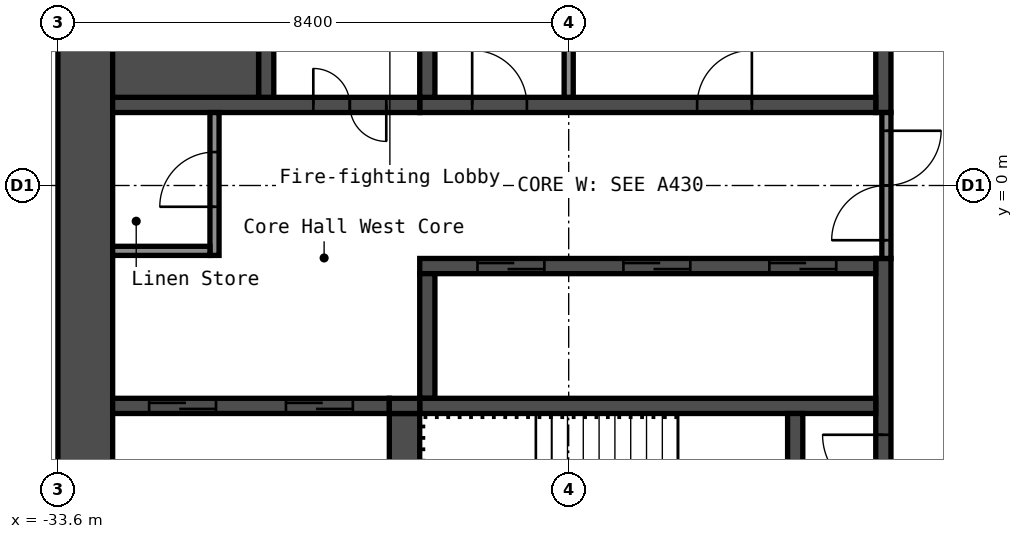
"""IFC4 building model, lengths in metres.
Left out: names, types, materials, properties, quantities, classifications, styles, units other than length and angle.
Written with IfcOpenShell. Run it as: python <this file> out.ifc"""

import sys

from ifc_helpers import new_model, si_unit, direction, frame, frame_2d, origin, place, context, subcontext, project, spatial, rectangle, extrude, element, fill, save


model = new_model("IFC4")
c1 = context("Model", 3, precision=1e-05, world=origin(), true_north=direction((0.0, 1.0)))
c2 = subcontext(c1, "Body", "Model", "MODEL_VIEW")
j1 = project(units=[si_unit("LENGTHUNIT", "METRE"), si_unit("PLANEANGLEUNIT", "RADIAN")], contexts=[c1])
p1 = place(None, origin())
s1 = spatial("IfcSite", under=j1, at=p1, CompositionType="ELEMENT")
p2 = place(p1, origin())
s2 = spatial("IfcBuilding", under=s1, at=p2, CompositionType="ELEMENT")
p3 = place(p2, frame((0.0, 0.0, 212.2)))
s3 = spatial("IfcBuildingStorey", under=s2, at=p3, CompositionType="ELEMENT", Elevation=212.2)
p4 = place(p3, frame((-33.15, -8.4, 0.0), z_axis=(0.0, 0.0, 1.0), x_axis=(0.0, 1.0, 0.0)))
e1 = element("IfcWall", 1, at=p4, inside=s3, PredefinedType="SHEAR", context=c2, shape_type="SweptSolid", body=[
    extrude(rectangle(XDim=16.8, YDim=0.9, at=frame_2d((8.4, 0.0))), origin(), (0.0, 0.0, 1.0), 2.75),
])
p5 = place(p3, frame((-20.025, 1.2, 0.0), z_axis=(0.0, 0.0, 1.0), x_axis=(0.0, 1.0, 0.0)))
e2 = element("IfcWall", 2, at=p5, inside=s3, PredefinedType="SHEAR", context=c2, shape_type="SweptSolid", body=[
    extrude(rectangle(XDim=6.3, YDim=0.25, at=frame_2d((3.15, 0.0))), origin(), (0.0, 0.0, 1.0), 2.75),
])
p6 = place(p3, frame((-20.025, -7.5, 0.0), z_axis=(0.0, 0.0, 1.0), x_axis=(0.0, 1.0, 0.0)))
e3 = element("IfcWall", 3, at=p6, inside=s3, PredefinedType="SHEAR", context=c2, shape_type="SweptSolid", body=[
    extrude(rectangle(XDim=6.3, YDim=0.25, at=frame_2d((3.15, 0.0))), origin(), (0.0, 0.0, 1.0), 2.75),
])
p7 = place(p6, frame((2.4, 0.0, 0.0)))
e4 = element("IfcOpeningElement", 4, at=p7, cuts=e3, PredefinedType="OPENING", context=c2, shape_type="SweptSolid", body=[
    extrude(rectangle(XDim=1.0, YDim=2.1, at=frame_2d((0.5, 1.05))), frame((0.0, 0.135, 0.0), z_axis=(0.0, -1.0, 0.0), x_axis=(1.0, 0.0, 0.0)), (0.0, 0.0, 1.0), 0.27),
])
p8 = place(p3, frame((-27.65, 1.325, 0.0), z_axis=(0.0, 0.0, 1.0), x_axis=(1.0, 0.0, 0.0)))
e5 = element("IfcWall", 5, at=p8, inside=s3, PredefinedType="SHEAR", context=c2, shape_type="SweptSolid", body=[
    extrude(rectangle(XDim=7.5, YDim=0.25, at=frame_2d((3.75, 0.0))), origin(), (0.0, 0.0, 1.0), 2.75),
])
p9 = place(p8, frame((4.562, 0.0, 0.0)))
e6 = element("IfcOpeningElement", 6, at=p9, cuts=e5, PredefinedType="OPENING", context=c2, shape_type="SweptSolid", body=[
    extrude(rectangle(XDim=0.9, YDim=2.1, at=frame_2d((0.45, 1.05))), frame((0.0, 0.135, 0.0), z_axis=(0.0, -1.0, 0.0), x_axis=(1.0, 0.0, 0.0)), (0.0, 0.0, 1.0), 0.27),
])
p10 = place(p8, frame((0.863, 0.0, 0.0)))
e7 = element("IfcOpeningElement", 7, at=p10, cuts=e5, PredefinedType="OPENING", context=c2, shape_type="SweptSolid", body=[
    extrude(rectangle(XDim=0.9, YDim=2.1, at=frame_2d((0.45, 1.05))), frame((0.0, 0.135, 0.0), z_axis=(0.0, -1.0, 0.0), x_axis=(1.0, 0.0, 0.0)), (0.0, 0.0, 1.0), 0.27),
])
p11 = place(p3, frame((-27.525, 1.45, 0.0), z_axis=(0.0, 0.0, 1.0), x_axis=(0.0, 1.0, 0.0)))
e8 = element("IfcWall", 8, at=p11, inside=s3, PredefinedType="SHEAR", context=c2, shape_type="SweptSolid", body=[
    extrude(rectangle(XDim=2.05, YDim=0.25, at=frame_2d((1.025, 0.0))), origin(), (0.0, 0.0, 1.0), 2.75),
])
p12 = place(p3, frame((-32.7, 1.325, 0.0), z_axis=(0.0, 0.0, 1.0), x_axis=(1.0, 0.0, 0.0)))
e9 = element("IfcWall", 9, at=p12, inside=s3, PredefinedType="SHEAR", context=c2, shape_type="SweptSolid", body=[
    extrude(rectangle(XDim=5.05, YDim=0.25, at=frame_2d((2.525, 0.0))), origin(), (0.0, 0.0, 1.0), 2.75),
])
p13 = place(p12, frame((3.3, 0.0, 0.0)))
e10 = element("IfcOpeningElement", 10, at=p13, cuts=e9, PredefinedType="OPENING", context=c2, shape_type="SweptSolid", body=[
    extrude(rectangle(XDim=1.2, YDim=2.1, at=frame_2d((0.6, 1.05))), frame((0.0, 0.135, 0.0), z_axis=(0.0, -1.0, 0.0), x_axis=(1.0, 0.0, 0.0)), (0.0, 0.0, 1.0), 0.27),
])
p14 = place(p3, frame((-30.175, 1.45, 0.0), z_axis=(0.0, 0.0, 1.0), x_axis=(0.0, 1.0, 0.0)))
e11 = element("IfcWall", 11, at=p14, inside=s3, PredefinedType="SHEAR", context=c2, shape_type="SweptSolid", body=[
    extrude(rectangle(XDim=6.05, YDim=0.25, at=frame_2d((3.025, 0.0))), origin(), (0.0, 0.0, 1.0), 2.75),
])
p15 = place(p14, frame((2.625, 0.0, 0.0)))
e12 = element("IfcOpeningElement", 12, at=p15, cuts=e11, PredefinedType="OPENING", context=c2, shape_type="SweptSolid", body=[
    extrude(rectangle(XDim=1.1, YDim=2.1, at=frame_2d((0.55, 1.05))), frame((0.0, 0.135, 0.0), z_axis=(0.0, -1.0, 0.0), x_axis=(1.0, 0.0, 0.0)), (0.0, 0.0, 1.0), 0.27),
])
p16 = place(p3, frame((-32.7, 2.375, 0.0), z_axis=(0.0, 0.0, 1.0), x_axis=(1.0, 0.0, 0.0)))
e13 = element("IfcWall", 13, at=p16, inside=s3, PredefinedType="SHEAR", context=c2, shape_type="SweptSolid", body=[
    extrude(rectangle(XDim=2.4, YDim=1.85, at=frame_2d((1.2, 0.0))), origin(), (0.0, 0.0, 1.0), 2.75),
])
p17 = place(p3, frame((-27.65, -1.325, 0.0), z_axis=(0.0, 0.0, 1.0), x_axis=(1.0, 0.0, 0.0)))
e14 = element("IfcWall", 14, at=p17, inside=s3, PredefinedType="SHEAR", context=c2, shape_type="SweptSolid", body=[
    extrude(rectangle(XDim=7.5, YDim=0.25, at=frame_2d((3.75, 0.0))), origin(), (0.0, 0.0, 1.0), 2.75),
])
p18 = place(p17, frame((5.75, 0.0, 0.0)))
e15 = element("IfcOpeningElement", 15, at=p18, cuts=e14, PredefinedType="OPENING", context=c2, shape_type="SweptSolid", body=[
    extrude(rectangle(XDim=1.1, YDim=2.1, at=frame_2d((0.55, 1.05))), frame((0.0, 0.135, 0.0), z_axis=(0.0, -1.0, 0.0), x_axis=(1.0, 0.0, 0.0)), (0.0, 0.0, 1.0), 0.27),
])
p19 = place(p17, frame((3.35, 0.0, 0.0)))
e16 = element("IfcOpeningElement", 16, at=p19, cuts=e14, PredefinedType="OPENING", context=c2, shape_type="SweptSolid", body=[
    extrude(rectangle(XDim=1.1, YDim=2.1, at=frame_2d((0.55, 1.05))), frame((0.0, 0.135, 0.0), z_axis=(0.0, -1.0, 0.0), x_axis=(1.0, 0.0, 0.0)), (0.0, 0.0, 1.0), 0.27),
])
p20 = place(p17, frame((0.95, 0.0, 0.0)))
e17 = element("IfcOpeningElement", 17, at=p20, cuts=e14, PredefinedType="OPENING", context=c2, shape_type="SweptSolid", body=[
    extrude(rectangle(XDim=1.1, YDim=2.1, at=frame_2d((0.55, 1.05))), frame((0.0, 0.135, 0.0), z_axis=(0.0, -1.0, 0.0), x_axis=(1.0, 0.0, 0.0)), (0.0, 0.0, 1.0), 0.27),
])
p21 = place(p3, frame((-27.525, -3.5, 0.0), z_axis=(0.0, 0.0, 1.0), x_axis=(0.0, 1.0, 0.0)))
e18 = element("IfcWall", 18, at=p21, inside=s3, PredefinedType="SHEAR", context=c2, shape_type="SweptSolid", body=[
    extrude(rectangle(XDim=2.05, YDim=0.25, at=frame_2d((1.025, 0.0))), origin(), (0.0, 0.0, 1.0), 2.75),
])
p22 = place(p3, frame((-27.65, -3.625, 0.0), z_axis=(0.0, 0.0, 1.0), x_axis=(1.0, 0.0, 0.0)))
e19 = element("IfcWall", 19, at=p22, inside=s3, PredefinedType="SHEAR", context=c2, shape_type="SweptSolid", body=[
    extrude(rectangle(XDim=7.5, YDim=0.25, at=frame_2d((3.75, 0.0))), origin(), (0.0, 0.0, 1.0), 2.75),
])
p23 = place(p3, frame((-21.475, -7.5, 0.0), z_axis=(0.0, 0.0, 1.0), x_axis=(0.0, 1.0, 0.0)))
e20 = element("IfcWall", 20, at=p23, inside=s3, PredefinedType="SHEAR", context=c2, shape_type="SweptSolid", body=[
    extrude(rectangle(XDim=3.75, YDim=0.25, at=frame_2d((1.875, 0.0))), origin(), (0.0, 0.0, 1.0), 2.75),
])
p24 = place(p23, frame((1.3, 0.0, 0.0)))
e21 = element("IfcOpeningElement", 21, at=p24, cuts=e20, PredefinedType="OPENING", context=c2, shape_type="SweptSolid", body=[
    extrude(rectangle(XDim=1.2, YDim=2.1, at=frame_2d((0.6, 1.05))), frame((0.0, 0.135, 0.0), z_axis=(0.0, -1.0, 0.0), x_axis=(1.0, 0.0, 0.0)), (0.0, 0.0, 1.0), 0.27),
])
p25 = place(p3, frame((-27.9, -7.5, 0.0), z_axis=(0.0, 0.0, 1.0), x_axis=(0.0, 1.0, 0.0)))
e22 = element("IfcWall", 22, at=p25, inside=s3, PredefinedType="SHEAR", context=c2, shape_type="SweptSolid", body=[
    extrude(rectangle(XDim=3.75, YDim=0.5, at=frame_2d((1.875, 0.0))), origin(), (0.0, 0.0, 1.0), 2.75),
])
p26 = place(p3, frame((-32.7, -3.625, 0.0), z_axis=(0.0, 0.0, 1.0), x_axis=(1.0, 0.0, 0.0)))
e23 = element("IfcWall", 23, at=p26, inside=s3, PredefinedType="SHEAR", context=c2, shape_type="SweptSolid", body=[
    extrude(rectangle(XDim=4.55, YDim=0.25, at=frame_2d((2.275, 0.0))), origin(), (0.0, 0.0, 1.0), 2.75),
])
p27 = place(p26, frame((2.85, 0.0, 0.0)))
e24 = element("IfcOpeningElement", 24, at=p27, cuts=e23, PredefinedType="OPENING", context=c2, shape_type="SweptSolid", body=[
    extrude(rectangle(XDim=1.1, YDim=2.1, at=frame_2d((0.55, 1.05))), frame((0.0, 0.135, 0.0), z_axis=(0.0, -1.0, 0.0), x_axis=(1.0, 0.0, 0.0)), (0.0, 0.0, 1.0), 0.27),
])
p28 = place(p26, frame((0.6, 0.0, 0.0)))
e25 = element("IfcOpeningElement", 25, at=p28, cuts=e23, PredefinedType="OPENING", context=c2, shape_type="SweptSolid", body=[
    extrude(rectangle(XDim=1.1, YDim=2.1, at=frame_2d((0.55, 1.05))), frame((0.0, 0.135, 0.0), z_axis=(0.0, -1.0, 0.0), x_axis=(1.0, 0.0, 0.0)), (0.0, 0.0, 1.0), 0.27),
])
p29 = place(p3, frame((-28.15, -3.625, 0.0), z_axis=(0.0, 0.0, 1.0), x_axis=(1.0, 0.0, 0.0)))
e26 = element("IfcWall", 26, at=p29, inside=s3, PredefinedType="SHEAR", context=c2, shape_type="SweptSolid", body=[
    extrude(rectangle(XDim=0.5, YDim=0.25, at=frame_2d((0.25, 0.0))), origin(), (0.0, 0.0, 1.0), 2.75),
])
p30 = place(p3, frame((-19.975, -1.2, 0.0), z_axis=(0.0, 0.0, 1.0), x_axis=(0.0, 1.0, 0.0)))
e27 = element("IfcWall", 27, at=p30, inside=s3, PredefinedType="PARTITIONING", context=c2, shape_type="SweptSolid", body=[
    extrude(rectangle(XDim=2.4, YDim=0.15, at=frame_2d((1.2, 0.0))), origin(), (0.0, 0.0, 1.0), 2.75),
])
p31 = place(p30, frame((0.3, 0.0, 0.0)))
e28 = element("IfcOpeningElement", 28, at=p31, cuts=e27, PredefinedType="OPENING", context=c2, shape_type="SweptSolid", body=[
    extrude(rectangle(XDim=1.8, YDim=2.1, at=frame_2d((0.9, 1.05))), frame((0.0, 0.085, 0.0), z_axis=(0.0, -1.0, 0.0), x_axis=(1.0, 0.0, 0.0)), (0.0, 0.0, 1.0), 0.17),
])
p32 = place(p3, frame((-31.025, -1.15, 0.0), z_axis=(0.0, 0.0, 1.0), x_axis=(0.0, 1.0, 0.0)))
e29 = element("IfcWall", 29, at=p32, inside=s3, PredefinedType="PARTITIONING", context=c2, shape_type="SweptSolid", body=[
    extrude(rectangle(XDim=2.35, YDim=0.15, at=frame_2d((1.175, 0.0))), origin(), (0.0, 0.0, 1.0), 2.75),
])
p33 = place(p32, frame((0.8, 0.0, 0.0)))
e30 = element("IfcOpeningElement", 30, at=p33, cuts=e29, PredefinedType="OPENING", context=c2, shape_type="SweptSolid", body=[
    extrude(rectangle(XDim=0.9, YDim=2.1, at=frame_2d((0.45, 1.05))), frame((0.0, 0.085, 0.0), z_axis=(0.0, -1.0, 0.0), x_axis=(1.0, 0.0, 0.0)), (0.0, 0.0, 1.0), 0.17),
])
p34 = place(p3, frame((-32.7, -1.075, 0.0), z_axis=(0.0, 0.0, 1.0), x_axis=(1.0, 0.0, 0.0)))
e31 = element("IfcWall", 31, at=p34, inside=s3, PredefinedType="PARTITIONING", context=c2, shape_type="SweptSolid", body=[
    extrude(rectangle(XDim=1.6, YDim=0.15, at=frame_2d((0.8, 0.0))), origin(), (0.0, 0.0, 1.0), 2.75),
])
p35 = place(p3, frame((-25.2, 1.45, 0.0), z_axis=(0.0, 0.0, 1.0), x_axis=(0.0, 1.0, 0.0)))
e32 = element("IfcWall", 32, at=p35, inside=s3, PredefinedType="PARTITIONING", context=c2, shape_type="SweptSolid", body=[
    extrude(rectangle(XDim=2.05, YDim=0.15, at=frame_2d((1.025, 0.0))), origin(), (0.0, 0.0, 1.0), 2.75),
])
p36 = place(p7, origin())
e33 = element("IfcDoor", 33, at=p36, inside=s3, OperationType="SINGLE_SWING_LEFT", PredefinedType="DOOR", context=c2, shape_type="SweptSolid", body=[
    extrude(rectangle(XDim=1.0, YDim=2.1, at=frame_2d((0.5, 1.05))), frame((0.0, 0.025, 0.0), z_axis=(0.0, -1.0, 0.0), x_axis=(1.0, 0.0, 0.0)), (0.0, 0.0, 1.0), 0.05),
])
fill(e4, e33)
p37 = place(p13, origin())
e34 = element("IfcDoor", 34, at=p37, inside=s3, OperationType="DOUBLE_DOOR_SINGLE_SWING", PredefinedType="DOOR", context=c2, shape_type="SweptSolid", body=[
    extrude(rectangle(XDim=1.2, YDim=2.1, at=frame_2d((0.6, 1.05))), frame((0.0, 0.025, 0.0), z_axis=(0.0, -1.0, 0.0), x_axis=(1.0, 0.0, 0.0)), (0.0, 0.0, 1.0), 0.05),
])
fill(e10, e34)
p38 = place(p31, origin())
e35 = element("IfcDoor", 35, at=p38, inside=s3, OperationType="DOUBLE_DOOR_SINGLE_SWING", PredefinedType="DOOR", context=c2, shape_type="SweptSolid", body=[
    extrude(rectangle(XDim=1.8, YDim=2.1, at=frame_2d((0.9, 1.05))), frame((0.0, 0.025, 0.0), z_axis=(0.0, -1.0, 0.0), x_axis=(1.0, 0.0, 0.0)), (0.0, 0.0, 1.0), 0.05),
])
fill(e28, e35)
p39 = place(p33, origin())
e36 = element("IfcDoor", 36, at=p39, inside=s3, OperationType="SINGLE_SWING_RIGHT", PredefinedType="DOOR", context=c2, shape_type="SweptSolid", body=[
    extrude(rectangle(XDim=0.9, YDim=2.1, at=frame_2d((0.45, 1.05))), frame((0.0, 0.025, 0.0), z_axis=(0.0, -1.0, 0.0), x_axis=(1.0, 0.0, 0.0)), (0.0, 0.0, 1.0), 0.05),
])
fill(e30, e36)
p40 = place(p9, origin())
e37 = element("IfcDoor", 37, at=p40, inside=s3, OperationType="SINGLE_SWING_LEFT", PredefinedType="DOOR", context=c2, shape_type="SweptSolid", body=[
    extrude(rectangle(XDim=0.9, YDim=2.1, at=frame_2d((0.45, 1.05))), frame((0.0, 0.025, 0.0), z_axis=(0.0, -1.0, 0.0), x_axis=(1.0, 0.0, 0.0)), (0.0, 0.0, 1.0), 0.05),
])
fill(e6, e37)
p41 = place(p10, origin())
e38 = element("IfcDoor", 38, at=p41, inside=s3, OperationType="SINGLE_SWING_RIGHT", PredefinedType="DOOR", context=c2, shape_type="SweptSolid", body=[
    extrude(rectangle(XDim=0.9, YDim=2.1, at=frame_2d((0.45, 1.05))), frame((0.0, 0.025, 0.0), z_axis=(0.0, -1.0, 0.0), x_axis=(1.0, 0.0, 0.0)), (0.0, 0.0, 1.0), 0.05),
])
fill(e7, e38)
p42 = place(p18, origin())
e39 = element("IfcDoor", 39, at=p42, inside=s3, OperationType="DOUBLE_DOOR_SLIDING", PredefinedType="DOOR", context=c2, shape_type="SweptSolid", body=[
    extrude(rectangle(XDim=1.1, YDim=2.1, at=frame_2d((0.55, 1.05))), frame((0.0, 0.025, 0.0), z_axis=(0.0, -1.0, 0.0), x_axis=(1.0, 0.0, 0.0)), (0.0, 0.0, 1.0), 0.05),
])
fill(e15, e39)
p43 = place(p19, origin())
e40 = element("IfcDoor", 40, at=p43, inside=s3, OperationType="DOUBLE_DOOR_SLIDING", PredefinedType="DOOR", context=c2, shape_type="SweptSolid", body=[
    extrude(rectangle(XDim=1.1, YDim=2.1, at=frame_2d((0.55, 1.05))), frame((0.0, 0.025, 0.0), z_axis=(0.0, -1.0, 0.0), x_axis=(1.0, 0.0, 0.0)), (0.0, 0.0, 1.0), 0.05),
])
fill(e16, e40)
p44 = place(p20, origin())
e41 = element("IfcDoor", 41, at=p44, inside=s3, OperationType="DOUBLE_DOOR_SLIDING", PredefinedType="DOOR", context=c2, shape_type="SweptSolid", body=[
    extrude(rectangle(XDim=1.1, YDim=2.1, at=frame_2d((0.55, 1.05))), frame((0.0, 0.025, 0.0), z_axis=(0.0, -1.0, 0.0), x_axis=(1.0, 0.0, 0.0)), (0.0, 0.0, 1.0), 0.05),
])
fill(e17, e41)
p45 = place(p27, origin())
e42 = element("IfcDoor", 42, at=p45, inside=s3, OperationType="DOUBLE_DOOR_SLIDING", PredefinedType="DOOR", context=c2, shape_type="SweptSolid", body=[
    extrude(rectangle(XDim=1.1, YDim=2.1, at=frame_2d((0.55, 1.05))), frame((0.0, 0.025, 0.0), z_axis=(0.0, -1.0, 0.0), x_axis=(1.0, 0.0, 0.0)), (0.0, 0.0, 1.0), 0.05),
])
fill(e24, e42)
p46 = place(p28, origin())
e43 = element("IfcDoor", 43, at=p46, inside=s3, OperationType="DOUBLE_DOOR_SLIDING", PredefinedType="DOOR", context=c2, shape_type="SweptSolid", body=[
    extrude(rectangle(XDim=1.1, YDim=2.1, at=frame_2d((0.55, 1.05))), frame((0.0, 0.025, 0.0), z_axis=(0.0, -1.0, 0.0), x_axis=(1.0, 0.0, 0.0)), (0.0, 0.0, 1.0), 0.05),
])
fill(e25, e43)
save(model, sys.argv[1])
